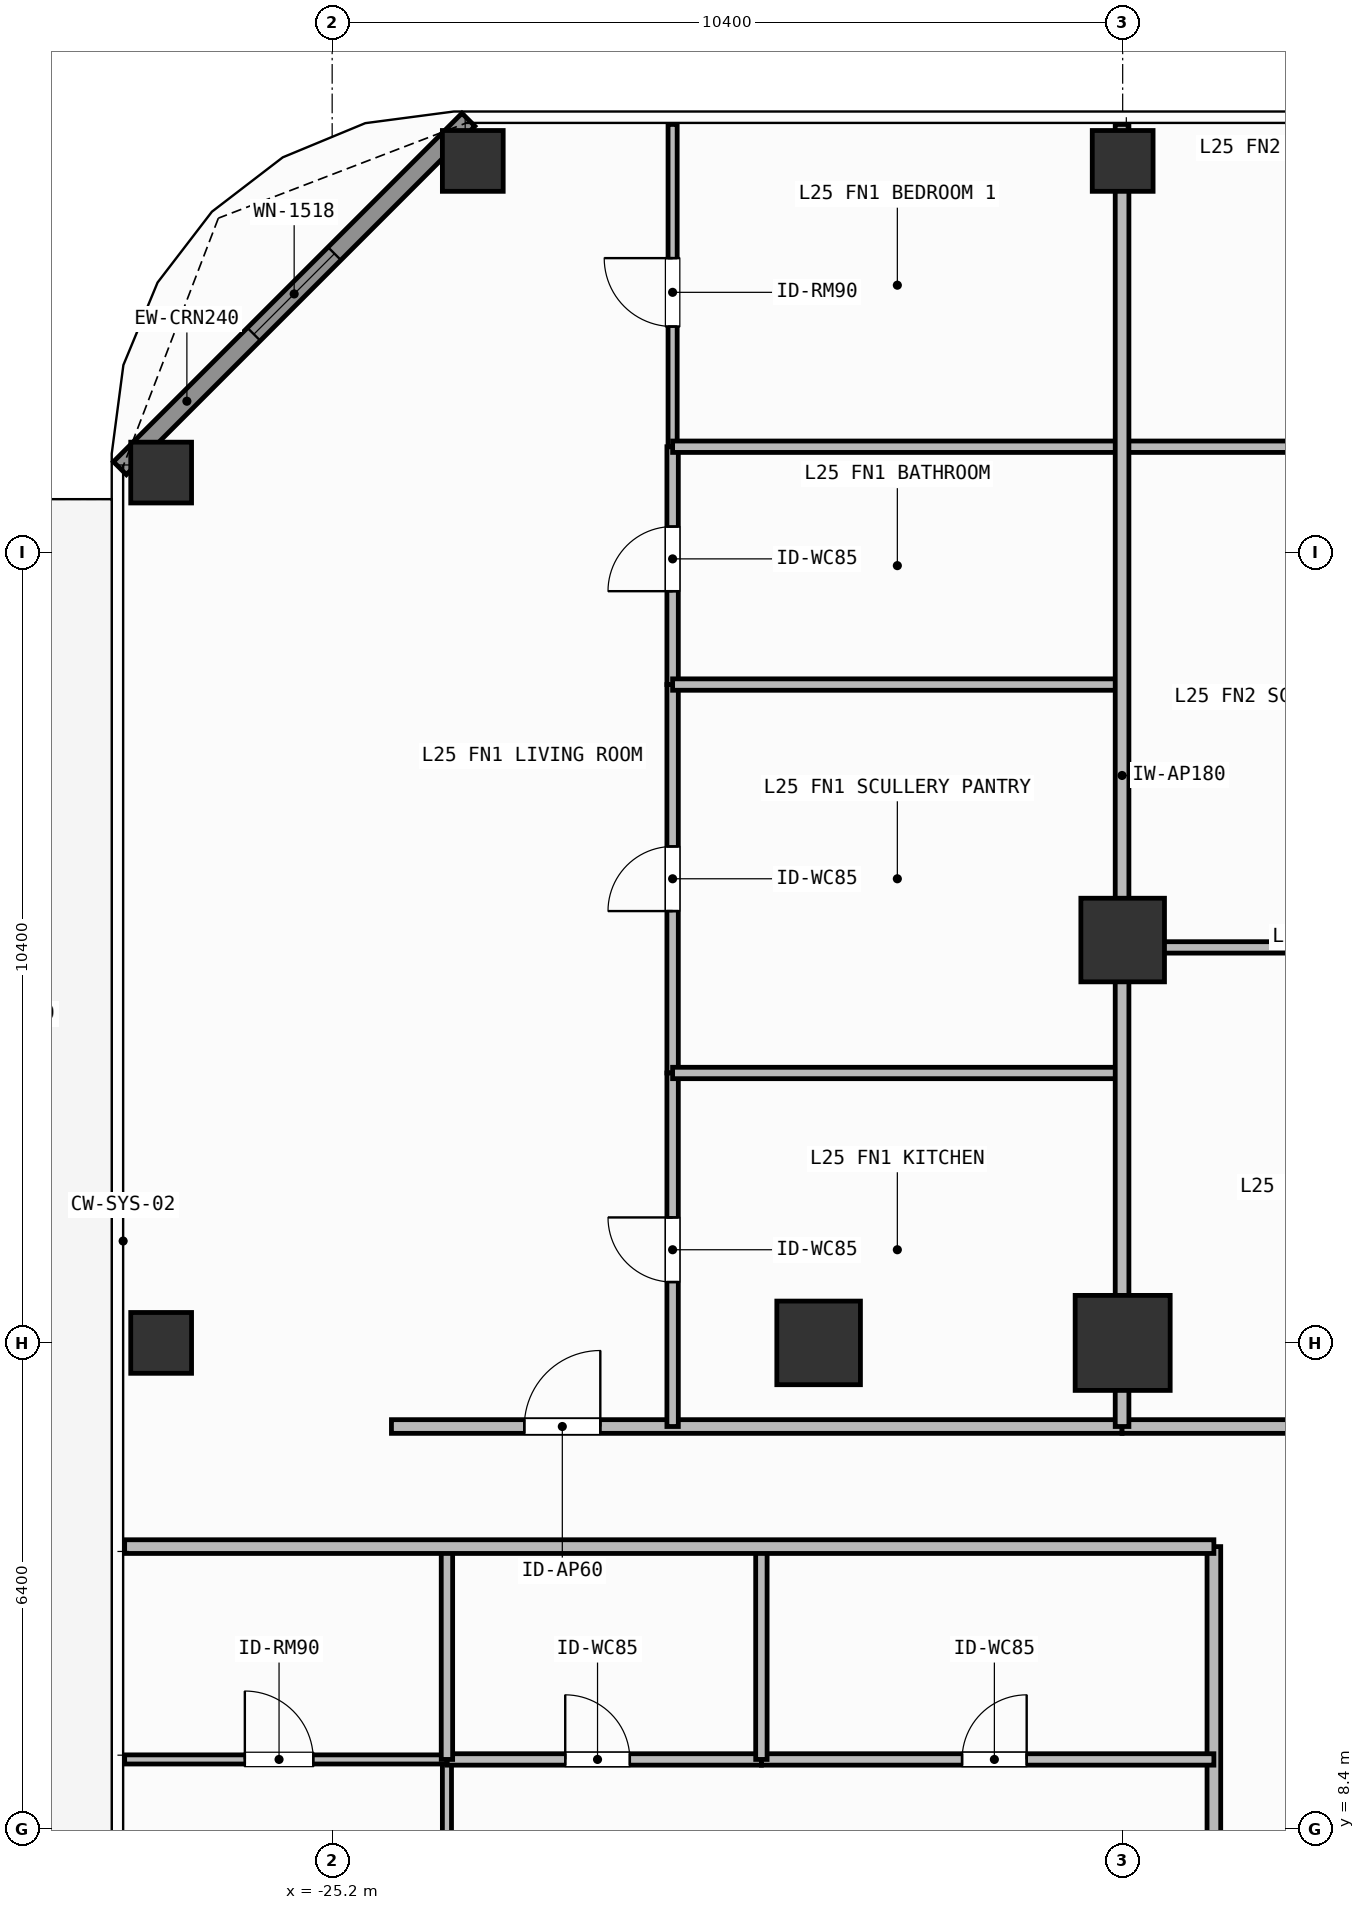
"""IFC4 building model, lengths in metres.
Left out: names, types, materials, properties, quantities, classifications, styles, units other than length and angle.
Written with IfcOpenShell. Run it as: python <this file> out.ifc"""

import sys

from ifc_helpers import new_model, si_unit, direction, frame, frame_2d, origin, origin_2d, place, context, subcontext, project, spatial, rectangle, hollow_rectangle, extrude, element, fill, save


model = new_model("IFC4")
c1 = context("Model", 3, precision=1e-05, world=origin(), true_north=direction((0.0, 1.0)))
c2 = subcontext(c1, "Body", "Model", "MODEL_VIEW")
j1 = project(units=[si_unit("LENGTHUNIT", "METRE"), si_unit("PLANEANGLEUNIT", "RADIAN")], contexts=[c1])
p1 = place(None, origin())
s1 = spatial("IfcSite", under=j1, at=p1, CompositionType="ELEMENT")
p2 = place(p1, origin())
s2 = spatial("IfcBuilding", under=s1, at=p2, CompositionType="ELEMENT")
p3 = place(p2, frame((0.0, 0.0, 100.8)))
s3 = spatial("IfcBuildingStorey", under=s2, at=p3, CompositionType="ELEMENT", Elevation=100.8)
p4 = place(p3, frame((-14.8, 14.8, 0.0), z_axis=(0.0, 0.0, 1.0), x_axis=(1.0, 0.0, 0.0)))
e1 = element("IfcColumn", 1, at=p4, inside=s3, PredefinedType="COLUMN", context=c2, shape_type="SweptSolid", body=[
    extrude(rectangle(XDim=1.25, YDim=1.25, at=origin_2d()), origin(), (0.0, 0.0, 1.0), 3.9),
])
for number, where, z_axis, x_axis in (
    (2, (-18.8, 14.8, 0.0), (0.0, 0.0, 1.0), (1.0, 0.0, 0.0)),
    (3, (-14.8, 20.1, 0.0), (0.0, 0.0, 1.0), (1.0, 0.0, 0.0)),
):
    element("IfcColumn", number, at=place(p3, frame(where, z_axis=z_axis, x_axis=x_axis)), inside=s3, PredefinedType="COLUMN", context=c2, shape_type="SweptSolid", body=[
        extrude(rectangle(XDim=1.1, YDim=1.1, at=origin_2d()), origin(), (0.0, 0.0, 1.0), 3.9),
    ])
for number, where, z_axis, x_axis in (
    (4, (-23.35, 30.35, 0.0), (0.0, 0.0, 1.0), (1.0, 0.0, 0.0)),
    (5, (-27.45, 26.25, 0.0), (0.0, 0.0, 1.0), (1.0, 0.0, 0.0)),
    (6, (-14.8, 30.35, 0.0), (0.0, 0.0, 1.0), (1.0, 0.0, 0.0)),
    (7, (-27.45, 14.8, 0.0), (0.0, 0.0, 1.0), (1.0, 0.0, 0.0)),
):
    element("IfcColumn", number, at=place(p3, frame(where, z_axis=z_axis, x_axis=x_axis)), inside=s3, PredefinedType="COLUMN", context=c2, shape_type="SweptSolid", body=[
        extrude(hollow_rectangle(XDim=0.8, YDim=0.8, WallThickness=0.036, at=origin_2d()), origin(), (0.0, 0.0, 1.0), 3.9),
    ])
p5 = place(p3, frame((-27.992, 26.308, 0.0), z_axis=(0.0, 0.0, 1.0), x_axis=(0.707106781187, 0.707106781187, 0.0)))
e8 = element("IfcWall", 8, at=p5, inside=s3, PredefinedType="SOLIDWALL", context=c2, shape_type="SweptSolid", body=[
    extrude(rectangle(XDim=6.484, YDim=0.24, at=frame_2d((3.242, 0.0))), origin(), (0.0, 0.0, 1.0), 3.68),
])
p6 = place(p5, frame((2.492, 0.0, 0.8)))
e9 = element("IfcOpeningElement", 9, at=p6, cuts=e8, PredefinedType="OPENING", context=c2, shape_type="SweptSolid", body=[
    extrude(rectangle(XDim=1.5, YDim=1.85, at=frame_2d((0.75, 0.925))), frame((0.0, 0.13, 0.0), z_axis=(0.0, -1.0, 0.0), x_axis=(1.0, 0.0, 0.0)), (0.0, 0.0, 1.0), 0.26),
])
p7 = place(p3, frame((-24.42, 13.7, 0.0), z_axis=(0.0, 0.0, 1.0), x_axis=(1.0, 0.0, 0.0)))
e10 = element("IfcWall", 10, at=p7, inside=s3, PredefinedType="PARTITIONING", context=c2, shape_type="SweptSolid", body=[
    extrude(rectangle(XDim=9.612, YDim=0.18, at=frame_2d((4.806, 0.0))), origin(), (0.0, 0.0, 1.0), 3.68),
])
p8 = place(p7, frame((1.748, 0.0, 0.0)))
e11 = element("IfcOpeningElement", 11, at=p8, cuts=e10, PredefinedType="OPENING", context=c2, shape_type="SweptSolid", body=[
    extrude(rectangle(XDim=1.0, YDim=2.2, at=frame_2d((0.5, 1.1))), frame((0.0, 0.1, 0.0), z_axis=(0.0, -1.0, 0.0), x_axis=(1.0, 0.0, 0.0)), (0.0, 0.0, 1.0), 0.2),
])
p9 = place(p3, frame((-20.721, 18.351, 0.0), z_axis=(0.0, 0.0, 1.0), x_axis=(0.0, 1.0, 0.0)))
e12 = element("IfcWall", 12, at=p9, inside=s3, PredefinedType="PARTITIONING", context=c2, shape_type="SweptSolid", body=[
    extrude(rectangle(XDim=5.11, YDim=0.15, at=frame_2d((2.555, 0.0))), origin(), (0.0, 0.0, 1.0), 3.68),
])
p10 = place(p9, frame((2.13, 0.0, 0.0)))
e13 = element("IfcOpeningElement", 13, at=p10, cuts=e12, PredefinedType="OPENING", context=c2, shape_type="SweptSolid", body=[
    extrude(rectangle(XDim=0.85, YDim=2.1, at=frame_2d((0.425, 1.05))), frame((0.0, 0.085, 0.0), z_axis=(0.0, -1.0, 0.0), x_axis=(1.0, 0.0, 0.0)), (0.0, 0.0, 1.0), 0.17),
])
p11 = place(p3, frame((-20.721, 13.7, 0.0), z_axis=(0.0, 0.0, 1.0), x_axis=(0.0, 1.0, 0.0)))
e14 = element("IfcWall", 14, at=p11, inside=s3, PredefinedType="PARTITIONING", context=c2, shape_type="SweptSolid", body=[
    extrude(rectangle(XDim=4.651, YDim=0.15, at=frame_2d((2.326, 0.0))), origin(), (0.0, 0.0, 1.0), 3.68),
])
p12 = place(p11, frame((1.9, 0.0, 0.0)))
e15 = element("IfcOpeningElement", 15, at=p12, cuts=e14, PredefinedType="OPENING", context=c2, shape_type="SweptSolid", body=[
    extrude(rectangle(XDim=0.85, YDim=2.1, at=frame_2d((0.425, 1.05))), frame((0.0, 0.085, 0.0), z_axis=(0.0, -1.0, 0.0), x_axis=(1.0, 0.0, 0.0)), (0.0, 0.0, 1.0), 0.17),
])
p13 = place(p3, frame((-20.721, 23.461, 0.0), z_axis=(0.0, 0.0, 1.0), x_axis=(0.0, 1.0, 0.0)))
e16 = element("IfcWall", 16, at=p13, inside=s3, PredefinedType="PARTITIONING", context=c2, shape_type="SweptSolid", body=[
    extrude(rectangle(XDim=3.129, YDim=0.15, at=frame_2d((1.564, 0.0))), origin(), (0.0, 0.0, 1.0), 3.68),
])
p14 = place(p13, frame((1.229, 0.0, 0.0)))
e17 = element("IfcOpeningElement", 17, at=p14, cuts=e16, PredefinedType="OPENING", context=c2, shape_type="SweptSolid", body=[
    extrude(rectangle(XDim=0.85, YDim=2.1, at=frame_2d((0.425, 1.05))), frame((0.0, 0.085, 0.0), z_axis=(0.0, -1.0, 0.0), x_axis=(1.0, 0.0, 0.0)), (0.0, 0.0, 1.0), 0.17),
])
p15 = place(p3, frame((-20.721, 26.59, 0.0), z_axis=(0.0, 0.0, 1.0), x_axis=(0.0, 1.0, 0.0)))
e18 = element("IfcWall", 18, at=p15, inside=s3, PredefinedType="PARTITIONING", context=c2, shape_type="SweptSolid", body=[
    extrude(rectangle(XDim=4.24, YDim=0.12, at=frame_2d((2.12, 0.0))), origin(), (0.0, 0.0, 1.0), 3.68),
])
p16 = place(p15, frame((1.581, 0.0, 0.0)))
e19 = element("IfcOpeningElement", 19, at=p16, cuts=e18, PredefinedType="OPENING", context=c2, shape_type="SweptSolid", body=[
    extrude(rectangle(XDim=0.9, YDim=2.1, at=frame_2d((0.45, 1.05))), frame((0.0, 0.07, 0.0), z_axis=(0.0, -1.0, 0.0), x_axis=(1.0, 0.0, 0.0)), (0.0, 0.0, 1.0), 0.14),
])
p17 = place(p3, frame((-14.808, 13.7, 0.0), z_axis=(0.0, 0.0, 1.0), x_axis=(1.0, 0.0, 0.0)))
e20 = element("IfcWall", 20, at=p17, inside=s3, PredefinedType="PARTITIONING", context=c2, shape_type="SweptSolid", body=[
    extrude(rectangle(XDim=21.212, YDim=0.18, at=frame_2d((10.606, 0.0))), origin(), (0.0, 0.0, 1.0), 3.68),
])
p18 = place(p17, frame((11.271, 0.0, 0.0)))
e21 = element("IfcOpeningElement", 21, at=p18, cuts=e20, PredefinedType="OPENING", context=c2, shape_type="SweptSolid", body=[
    extrude(rectangle(XDim=1.0, YDim=2.2, at=frame_2d((0.5, 1.1))), frame((0.0, 0.1, 0.0), z_axis=(0.0, -1.0, 0.0), x_axis=(1.0, 0.0, 0.0)), (0.0, 0.0, 1.0), 0.2),
])
p19 = place(p3, frame((-13.6, -1.6, 0.0), z_axis=(0.0, 0.0, 1.0), x_axis=(0.0, 1.0, 0.0)))
e22 = element("IfcWall", 22, at=p19, inside=s3, PredefinedType="PARTITIONING", context=c2, shape_type="SweptSolid", body=[
    extrude(rectangle(XDim=13.72, YDim=0.18, at=frame_2d((6.86, 0.0))), origin(), (0.0, 0.0, 1.0), 3.68),
])
p20 = place(p19, frame((6.989, 0.0, 0.0)))
e23 = element("IfcOpeningElement", 23, at=p20, cuts=e22, PredefinedType="OPENING", context=c2, shape_type="SweptSolid", body=[
    extrude(rectangle(XDim=1.0, YDim=2.2, at=frame_2d((0.5, 1.1))), frame((0.0, 0.1, 0.0), z_axis=(0.0, -1.0, 0.0), x_axis=(1.0, 0.0, 0.0)), (0.0, 0.0, 1.0), 0.2),
])
p21 = place(p3, frame((-23.69, 2.591, 0.0), z_axis=(0.0, 0.0, 1.0), x_axis=(0.0, 1.0, 0.0)))
e24 = element("IfcWall", 24, at=p21, inside=s3, PredefinedType="PARTITIONING", context=c2, shape_type="SweptSolid", body=[
    extrude(rectangle(XDim=6.729, YDim=0.12, at=frame_2d((3.365, 0.0))), origin(), (0.0, 0.0, 1.0), 3.68),
])
p22 = place(p21, frame((2.826, 0.0, 0.0)))
e25 = element("IfcOpeningElement", 25, at=p22, cuts=e24, PredefinedType="OPENING", context=c2, shape_type="SweptSolid", body=[
    extrude(rectangle(XDim=0.9, YDim=2.1, at=frame_2d((0.45, 1.05))), frame((0.0, 0.07, 0.0), z_axis=(0.0, -1.0, 0.0), x_axis=(1.0, 0.0, 0.0)), (0.0, 0.0, 1.0), 0.14),
])
p23 = place(p3, frame((-23.69, 9.32, 0.0), z_axis=(0.0, 0.0, 1.0), x_axis=(1.0, 0.0, 0.0)))
e26 = element("IfcWall", 26, at=p23, inside=s3, PredefinedType="PARTITIONING", context=c2, shape_type="SweptSolid", body=[
    extrude(rectangle(XDim=4.137, YDim=0.15, at=frame_2d((2.068, 0.0))), origin(), (0.0, 0.0, 1.0), 3.68),
])
p24 = place(p23, frame((1.556, 0.0, 0.0)))
e27 = element("IfcOpeningElement", 27, at=p24, cuts=e26, PredefinedType="OPENING", context=c2, shape_type="SweptSolid", body=[
    extrude(rectangle(XDim=0.85, YDim=2.1, at=frame_2d((0.425, 1.05))), frame((0.0, 0.085, 0.0), z_axis=(0.0, -1.0, 0.0), x_axis=(1.0, 0.0, 0.0)), (0.0, 0.0, 1.0), 0.17),
])
p25 = place(p3, frame((-19.553, 9.32, 0.0), z_axis=(0.0, 0.0, 1.0), x_axis=(1.0, 0.0, 0.0)))
e28 = element("IfcWall", 28, at=p25, inside=s3, PredefinedType="PARTITIONING", context=c2, shape_type="SweptSolid", body=[
    extrude(rectangle(XDim=5.953, YDim=0.15, at=frame_2d((2.977, 0.0))), origin(), (0.0, 0.0, 1.0), 3.68),
])
p26 = place(p25, frame((2.64, 0.0, 0.0)))
e29 = element("IfcOpeningElement", 29, at=p26, cuts=e28, PredefinedType="OPENING", context=c2, shape_type="SweptSolid", body=[
    extrude(rectangle(XDim=0.85, YDim=2.1, at=frame_2d((0.425, 1.05))), frame((0.0, 0.085, 0.0), z_axis=(0.0, -1.0, 0.0), x_axis=(1.0, 0.0, 0.0)), (0.0, 0.0, 1.0), 0.17),
])
p27 = place(p3, frame((-27.93, 9.32, 0.0), z_axis=(0.0, 0.0, 1.0), x_axis=(1.0, 0.0, 0.0)))
e30 = element("IfcWall", 30, at=p27, inside=s3, PredefinedType="PARTITIONING", context=c2, shape_type="SweptSolid", body=[
    extrude(rectangle(XDim=4.24, YDim=0.12, at=frame_2d((2.12, 0.0))), origin(), (0.0, 0.0, 1.0), 3.68),
])
p28 = place(p27, frame((1.581, 0.0, 0.0)))
e31 = element("IfcOpeningElement", 31, at=p28, cuts=e30, PredefinedType="OPENING", context=c2, shape_type="SweptSolid", body=[
    extrude(rectangle(XDim=0.9, YDim=2.1, at=frame_2d((0.45, 1.05))), frame((0.0, 0.07, 0.0), z_axis=(0.0, -1.0, 0.0), x_axis=(1.0, 0.0, 0.0)), (0.0, 0.0, 1.0), 0.14),
])
for number, where, z_axis, x_axis in (
    (32, (-20.721, 18.351, 0.0), (0.0, 0.0, 1.0), (1.0, 0.0, 0.0)),
    (33, (-20.721, 23.461, 0.0), (0.0, 0.0, 1.0), (1.0, 0.0, 0.0)),
    (34, (-20.721, 26.59, 0.0), (0.0, 0.0, 1.0), (1.0, 0.0, 0.0)),
):
    element("IfcWall", number, at=place(p3, frame(where, z_axis=z_axis, x_axis=x_axis)), inside=s3, PredefinedType="PARTITIONING", context=c2, shape_type="SweptSolid", body=[
        extrude(rectangle(XDim=5.913, YDim=0.15, at=frame_2d((2.957, 0.0))), origin(), (0.0, 0.0, 1.0), 3.68),
    ])
p29 = place(p3, frame((-14.808, 20.003, 0.0), z_axis=(0.0, 0.0, 1.0), x_axis=(1.0, 0.0, 0.0)))
e35 = element("IfcWall", 35, at=p29, inside=s3, PredefinedType="PARTITIONING", context=c2, shape_type="SweptSolid", body=[
    extrude(rectangle(XDim=5.394, YDim=0.15, at=frame_2d((2.697, 0.0))), origin(), (0.0, 0.0, 1.0), 3.082),
])
p30 = place(p3, frame((-14.808, 26.59, 0.0), z_axis=(0.0, 0.0, 1.0), x_axis=(1.0, 0.0, 0.0)))
e36 = element("IfcWall", 36, at=p30, inside=s3, PredefinedType="PARTITIONING", context=c2, shape_type="SweptSolid", body=[
    extrude(rectangle(XDim=5.394, YDim=0.15, at=frame_2d((2.697, 0.0))), origin(), (0.0, 0.0, 1.0), 3.68),
])
p31 = place(p3, frame((-14.808, 13.7, 0.0), z_axis=(0.0, 0.0, 1.0), x_axis=(0.0, 1.0, 0.0)))
e37 = element("IfcWall", 37, at=p31, inside=s3, PredefinedType="PARTITIONING", context=c2, shape_type="SweptSolid", body=[
    extrude(rectangle(XDim=17.13, YDim=0.18, at=frame_2d((8.565, 0.0))), origin(), (0.0, 0.0, 1.0), 3.082),
])
for number, where, z_axis, x_axis in (
    (38, (-19.553, 9.32, 0.0), (0.0, 0.0, 1.0), (0.0, 1.0, 0.0)),
    (39, (-23.69, 9.32, 0.0), (0.0, 0.0, 1.0), (0.0, 1.0, 0.0)),
):
    element("IfcWall", number, at=place(p3, frame(where, z_axis=z_axis, x_axis=x_axis)), inside=s3, PredefinedType="PARTITIONING", context=c2, shape_type="SweptSolid", body=[
        extrude(rectangle(XDim=2.8, YDim=0.15, at=frame_2d((1.4, 0.0))), origin(), (0.0, 0.0, 1.0), 3.68),
    ])
p32 = place(p3, frame((-27.93, 12.12, 0.0), z_axis=(0.0, 0.0, 1.0), x_axis=(1.0, 0.0, 0.0)))
e40 = element("IfcWall", 40, at=p32, inside=s3, PredefinedType="PARTITIONING", context=c2, shape_type="SweptSolid", body=[
    extrude(rectangle(XDim=14.33, YDim=0.18, at=frame_2d((7.165, 0.0))), origin(), (0.0, 0.0, 1.0), 3.68),
])
p33 = place(p6, origin())
e41 = element("IfcWindow", 41, at=p33, inside=s3, PartitioningType="SINGLE_PANEL", PredefinedType="WINDOW", context=c2, shape_type="SweptSolid", body=[
    extrude(rectangle(XDim=1.5, YDim=1.85, at=frame_2d((0.75, 0.925))), frame((0.0, 0.03, 0.0), z_axis=(0.0, -1.0, 0.0), x_axis=(1.0, 0.0, 0.0)), (0.0, 0.0, 1.0), 0.06),
])
fill(e9, e41)
p34 = place(p8, origin())
e42 = element("IfcDoor", 42, at=p34, inside=s3, OperationType="SINGLE_SWING_RIGHT", PredefinedType="DOOR", context=c2, shape_type="SweptSolid", body=[
    extrude(rectangle(XDim=1.0, YDim=2.2, at=frame_2d((0.5, 1.1))), frame((0.0, 0.025, 0.0), z_axis=(0.0, -1.0, 0.0), x_axis=(1.0, 0.0, 0.0)), (0.0, 0.0, 1.0), 0.05),
])
fill(e11, e42)
p35 = place(p10, origin())
e43 = element("IfcDoor", 43, at=p35, inside=s3, OperationType="SINGLE_SWING_LEFT", PredefinedType="DOOR", context=c2, shape_type="SweptSolid", body=[
    extrude(rectangle(XDim=0.85, YDim=2.1, at=frame_2d((0.425, 1.05))), frame((0.0, 0.025, 0.0), z_axis=(0.0, -1.0, 0.0), x_axis=(1.0, 0.0, 0.0)), (0.0, 0.0, 1.0), 0.05),
])
fill(e13, e43)
p36 = place(p12, origin())
e44 = element("IfcDoor", 44, at=p36, inside=s3, OperationType="SINGLE_SWING_RIGHT", PredefinedType="DOOR", context=c2, shape_type="SweptSolid", body=[
    extrude(rectangle(XDim=0.85, YDim=2.1, at=frame_2d((0.425, 1.05))), frame((0.0, 0.025, 0.0), z_axis=(0.0, -1.0, 0.0), x_axis=(1.0, 0.0, 0.0)), (0.0, 0.0, 1.0), 0.05),
])
fill(e15, e44)
p37 = place(p14, origin())
e45 = element("IfcDoor", 45, at=p37, inside=s3, OperationType="SINGLE_SWING_LEFT", PredefinedType="DOOR", context=c2, shape_type="SweptSolid", body=[
    extrude(rectangle(XDim=0.85, YDim=2.1, at=frame_2d((0.425, 1.05))), frame((0.0, 0.025, 0.0), z_axis=(0.0, -1.0, 0.0), x_axis=(1.0, 0.0, 0.0)), (0.0, 0.0, 1.0), 0.05),
])
fill(e17, e45)
p38 = place(p16, origin())
e46 = element("IfcDoor", 46, at=p38, inside=s3, OperationType="SINGLE_SWING_RIGHT", PredefinedType="DOOR", context=c2, shape_type="SweptSolid", body=[
    extrude(rectangle(XDim=0.9, YDim=2.1, at=frame_2d((0.45, 1.05))), frame((0.0, 0.025, 0.0), z_axis=(0.0, -1.0, 0.0), x_axis=(1.0, 0.0, 0.0)), (0.0, 0.0, 1.0), 0.05),
])
fill(e19, e46)
p39 = place(p24, origin())
e47 = element("IfcDoor", 47, at=p39, inside=s3, OperationType="SINGLE_SWING_LEFT", PredefinedType="DOOR", context=c2, shape_type="SweptSolid", body=[
    extrude(rectangle(XDim=0.85, YDim=2.1, at=frame_2d((0.425, 1.05))), frame((0.0, 0.025, 0.0), z_axis=(0.0, -1.0, 0.0), x_axis=(1.0, 0.0, 0.0)), (0.0, 0.0, 1.0), 0.05),
])
fill(e27, e47)
p40 = place(p26, origin())
e48 = element("IfcDoor", 48, at=p40, inside=s3, OperationType="SINGLE_SWING_RIGHT", PredefinedType="DOOR", context=c2, shape_type="SweptSolid", body=[
    extrude(rectangle(XDim=0.85, YDim=2.1, at=frame_2d((0.425, 1.05))), frame((0.0, 0.025, 0.0), z_axis=(0.0, -1.0, 0.0), x_axis=(1.0, 0.0, 0.0)), (0.0, 0.0, 1.0), 0.05),
])
fill(e29, e48)
p41 = place(p28, origin())
e49 = element("IfcDoor", 49, at=p41, inside=s3, OperationType="SINGLE_SWING_LEFT", PredefinedType="DOOR", context=c2, shape_type="SweptSolid", body=[
    extrude(rectangle(XDim=0.9, YDim=2.1, at=frame_2d((0.45, 1.05))), frame((0.0, 0.025, 0.0), z_axis=(0.0, -1.0, 0.0), x_axis=(1.0, 0.0, 0.0)), (0.0, 0.0, 1.0), 0.05),
])
fill(e31, e49)
save(model, sys.argv[1])
